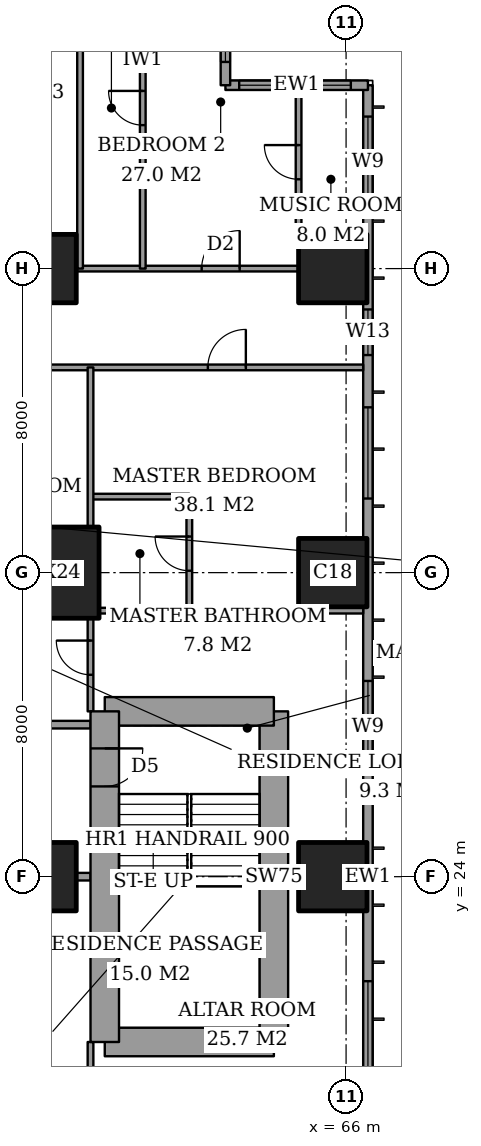
"""IFC4 building model, lengths in metres.
Left out: names, types, materials, properties, quantities, classifications, styles, units other than length and angle.
Written with IfcOpenShell. Run it as: python <this file> out.ifc"""

import sys

from ifc_helpers import new_model, si_unit, direction, frame, frame_2d, origin, origin_2d, place, context, subcontext, project, spatial, rectangle, extrude, element, fill, save


model = new_model("IFC4")
c1 = context("Model", 3, precision=1e-05, world=origin(), true_north=direction((0.0, 1.0)))
c2 = subcontext(c1, "Body", "Model", "MODEL_VIEW")
j1 = project(units=[si_unit("LENGTHUNIT", "METRE"), si_unit("PLANEANGLEUNIT", "RADIAN")], contexts=[c1])
p1 = place(None, origin())
s1 = spatial("IfcSite", under=j1, at=p1, CompositionType="ELEMENT")
p2 = place(p1, origin())
s2 = spatial("IfcBuilding", under=s1, at=p2, CompositionType="ELEMENT")
p3 = place(p2, frame((0.0, 0.0, 182.2)))
s3 = spatial("IfcBuildingStorey", under=s2, at=p3, CompositionType="ELEMENT", Elevation=182.2)
p4 = place(p3, frame((58.0, 24.0, 0.0), z_axis=(0.0, 0.0, 1.0), x_axis=(1.0, 0.0, 0.0)))
e1 = element("IfcColumn", 1, at=p4, inside=s3, PredefinedType="COLUMN", context=c2, shape_type="SweptSolid", body=[
    extrude(rectangle(XDim=1.8, YDim=1.8, at=origin_2d()), origin(), (0.0, 0.0, 1.0), 3.6),
])
p5 = place(p3, frame((58.0, 32.0, 0.0), z_axis=(0.0, 0.0, 1.0), x_axis=(1.0, 0.0, 0.0)))
e2 = element("IfcColumn", 2, at=p5, inside=s3, PredefinedType="COLUMN", context=c2, shape_type="SweptSolid", body=[
    extrude(rectangle(XDim=3.0, YDim=2.4, at=origin_2d()), origin(), (0.0, 0.0, 1.0), 3.6),
])
for number, where, z_axis, x_axis in (
    (3, (58.0, 40.0, 0.0), (0.0, 0.0, 1.0), (1.0, 0.0, 0.0)),
    (4, (65.65, 24.0, 0.0), (0.0, 0.0, 1.0), (1.0, 0.0, 0.0)),
    (5, (65.65, 32.0, 0.0), (0.0, 0.0, 1.0), (1.0, 0.0, 0.0)),
    (6, (65.65, 40.0, 0.0), (0.0, 0.0, 1.0), (1.0, 0.0, 0.0)),
):
    element("IfcColumn", number, at=place(p3, frame(where, z_axis=z_axis, x_axis=x_axis)), inside=s3, PredefinedType="COLUMN", context=c2, shape_type="SweptSolid", body=[
        extrude(rectangle(XDim=1.8, YDim=1.8, at=origin_2d()), origin(), (0.0, 0.0, 1.0), 3.6),
    ])
p6 = place(p3, frame((59.65, 19.65, 0.0), z_axis=(0.0, 0.0, 1.0), x_axis=(1.0, 0.0, 0.0)))
e7 = element("IfcWall", 7, at=p6, inside=s3, PredefinedType="SHEAR", context=c2, shape_type="SweptSolid", body=[
    extrude(rectangle(XDim=4.45, YDim=0.75, at=frame_2d((2.225, 0.0))), origin(), (0.0, 0.0, 1.0), 3.6),
])
p7 = place(p3, frame((64.1, 19.65, 0.0), z_axis=(0.0, 0.0, 1.0), x_axis=(0.0, 1.0, 0.0)))
e8 = element("IfcWall", 8, at=p7, inside=s3, PredefinedType="SHEAR", context=c2, shape_type="SweptSolid", body=[
    extrude(rectangle(XDim=8.7, YDim=0.75, at=frame_2d((4.35, 0.0))), origin(), (0.0, 0.0, 1.0), 3.6),
])
p8 = place(p3, frame((64.1, 28.35, 0.0), z_axis=(0.0, 0.0, 1.0), x_axis=(-1.0, 0.0, 0.0)))
e9 = element("IfcWall", 9, at=p8, inside=s3, PredefinedType="SHEAR", context=c2, shape_type="SweptSolid", body=[
    extrude(rectangle(XDim=4.45, YDim=0.75, at=frame_2d((2.225, 0.0))), origin(), (0.0, 0.0, 1.0), 3.6),
])
p9 = place(p3, frame((59.65, 28.35, 0.0), z_axis=(0.0, 0.0, 1.0), x_axis=(0.0, -1.0, 0.0)))
e10 = element("IfcWall", 10, at=p9, inside=s3, PredefinedType="SHEAR", context=c2, shape_type="SweptSolid", body=[
    extrude(rectangle(XDim=8.7, YDim=0.75, at=frame_2d((4.35, 0.0))), origin(), (0.0, 0.0, 1.0), 3.6),
])
p10 = place(p9, frame((0.975, 0.0, 0.0)))
e11 = element("IfcOpeningElement", 11, at=p10, cuts=e10, PredefinedType="OPENING", context=c2, shape_type="SweptSolid", body=[
    extrude(rectangle(XDim=1.0, YDim=2.1, at=frame_2d((0.5, 1.05))), frame((0.0, 0.385, 0.0), z_axis=(0.0, -1.0, 0.0), x_axis=(1.0, 0.0, 0.0)), (0.0, 0.0, 1.0), 0.77),
])
p11 = place(p3, frame((66.575, 3.175, 0.0), z_axis=(0.0, 0.0, 1.0), x_axis=(0.0, 1.0, 0.0)))
e12 = element("IfcWall", 12, at=p11, inside=s3, PredefinedType="SOLIDWALL", context=c2, shape_type="SweptSolid", body=[
    extrude(rectangle(XDim=41.65, YDim=0.25, at=frame_2d((20.825, 0.0))), origin(), (0.0, 0.0, 1.0), 3.6),
])
p12 = place(p11, frame((0.825, 0.0, 0.2)))
e13 = element("IfcOpeningElement", 13, at=p12, cuts=e12, PredefinedType="OPENING", context=c2, shape_type="SweptSolid", body=[
    extrude(rectangle(XDim=2.4, YDim=2.4, at=frame_2d((1.2, 1.2))), frame((0.0, 0.135, 0.0), z_axis=(0.0, -1.0, 0.0), x_axis=(1.0, 0.0, 0.0)), (0.0, 0.0, 1.0), 0.27),
])
p13 = place(p11, frame((6.6, 0.0, 0.2)))
e14 = element("IfcOpeningElement", 14, at=p13, cuts=e12, PredefinedType="OPENING", context=c2, shape_type="SweptSolid", body=[
    extrude(rectangle(XDim=1.2, YDim=2.4, at=frame_2d((0.6, 1.2))), frame((0.0, 0.135, 0.0), z_axis=(0.0, -1.0, 0.0), x_axis=(1.0, 0.0, 0.0)), (0.0, 0.0, 1.0), 0.27),
])
p14 = place(p11, frame((8.775, 0.0, 0.2)))
e15 = element("IfcOpeningElement", 15, at=p14, cuts=e12, PredefinedType="OPENING", context=c2, shape_type="SweptSolid", body=[
    extrude(rectangle(XDim=2.4, YDim=2.4, at=frame_2d((1.2, 1.2))), frame((0.0, 0.135, 0.0), z_axis=(0.0, -1.0, 0.0), x_axis=(1.0, 0.0, 0.0)), (0.0, 0.0, 1.0), 0.27),
])
p15 = place(p11, frame((15.675, 0.0, 0.2)))
e16 = element("IfcOpeningElement", 16, at=p15, cuts=e12, PredefinedType="OPENING", context=c2, shape_type="SweptSolid", body=[
    extrude(rectangle(XDim=2.4, YDim=2.4, at=frame_2d((1.2, 1.2))), frame((0.0, 0.135, 0.0), z_axis=(0.0, -1.0, 0.0), x_axis=(1.0, 0.0, 0.0)), (0.0, 0.0, 1.0), 0.27),
])
p16 = place(p11, frame((23.575, 0.0, 0.2)))
e17 = element("IfcOpeningElement", 17, at=p16, cuts=e12, PredefinedType="OPENING", context=c2, shape_type="SweptSolid", body=[
    extrude(rectangle(XDim=2.4, YDim=2.4, at=frame_2d((1.2, 1.2))), frame((0.0, 0.135, 0.0), z_axis=(0.0, -1.0, 0.0), x_axis=(1.0, 0.0, 0.0)), (0.0, 0.0, 1.0), 0.27),
])
p17 = place(p11, frame((30.775, 0.0, 0.2)))
e18 = element("IfcOpeningElement", 18, at=p17, cuts=e12, PredefinedType="OPENING", context=c2, shape_type="SweptSolid", body=[
    extrude(rectangle(XDim=2.4, YDim=2.4, at=frame_2d((1.2, 1.2))), frame((0.0, 0.135, 0.0), z_axis=(0.0, -1.0, 0.0), x_axis=(1.0, 0.0, 0.0)), (0.0, 0.0, 1.0), 0.27),
])
p18 = place(p11, frame((34.55, 0.0, 0.2)))
e19 = element("IfcOpeningElement", 19, at=p18, cuts=e12, PredefinedType="OPENING", context=c2, shape_type="SweptSolid", body=[
    extrude(rectangle(XDim=1.2, YDim=2.4, at=frame_2d((0.6, 1.2))), frame((0.0, 0.135, 0.0), z_axis=(0.0, -1.0, 0.0), x_axis=(1.0, 0.0, 0.0)), (0.0, 0.0, 1.0), 0.27),
])
p19 = place(p11, frame((38.425, 0.0, 0.2)))
e20 = element("IfcOpeningElement", 20, at=p19, cuts=e12, PredefinedType="OPENING", context=c2, shape_type="SweptSolid", body=[
    extrude(rectangle(XDim=2.4, YDim=2.4, at=frame_2d((1.2, 1.2))), frame((0.0, 0.135, 0.0), z_axis=(0.0, -1.0, 0.0), x_axis=(1.0, 0.0, 0.0)), (0.0, 0.0, 1.0), 0.27),
])
p20 = place(p3, frame((66.575, 44.825, 0.0), z_axis=(0.0, 0.0, 1.0), x_axis=(-1.0, 0.0, 0.0)))
e21 = element("IfcWall", 21, at=p20, inside=s3, PredefinedType="SOLIDWALL", context=c2, shape_type="SweptSolid", body=[
    extrude(rectangle(XDim=3.75, YDim=0.25, at=frame_2d((1.875, 0.0))), origin(), (0.0, 0.0, 1.0), 3.6),
])
p21 = place(p20, frame((0.45, 0.0, 0.2)))
e22 = element("IfcOpeningElement", 22, at=p21, cuts=e21, PredefinedType="OPENING", context=c2, shape_type="SweptSolid", body=[
    extrude(rectangle(XDim=1.2, YDim=2.4, at=frame_2d((0.6, 1.2))), frame((0.0, 0.135, 0.0), z_axis=(0.0, -1.0, 0.0), x_axis=(1.0, 0.0, 0.0)), (0.0, 0.0, 1.0), 0.27),
])
p22 = place(p20, frame((2.188, 0.0, 0.2)))
e23 = element("IfcOpeningElement", 23, at=p22, cuts=e21, PredefinedType="OPENING", context=c2, shape_type="SweptSolid", body=[
    extrude(rectangle(XDim=1.2, YDim=2.4, at=frame_2d((0.6, 1.2))), frame((0.0, 0.135, 0.0), z_axis=(0.0, -1.0, 0.0), x_axis=(1.0, 0.0, 0.0)), (0.0, 0.0, 1.0), 0.27),
])
p23 = place(p3, frame((62.825, 44.825, 0.0), z_axis=(0.0, 0.0, 1.0), x_axis=(0.0, 1.0, 0.0)))
e24 = element("IfcWall", 24, at=p23, inside=s3, PredefinedType="SOLIDWALL", context=c2, shape_type="SweptSolid", body=[
    extrude(rectangle(XDim=3.75, YDim=0.25, at=frame_2d((1.875, 0.0))), origin(), (0.0, 0.0, 1.0), 3.6),
])
p24 = place(p23, frame((0.613, 0.0, 0.2)))
e25 = element("IfcOpeningElement", 25, at=p24, cuts=e24, PredefinedType="OPENING", context=c2, shape_type="SweptSolid", body=[
    extrude(rectangle(XDim=2.4, YDim=2.4, at=frame_2d((1.2, 1.2))), frame((0.0, 0.135, 0.0), z_axis=(0.0, -1.0, 0.0), x_axis=(1.0, 0.0, 0.0)), (0.0, 0.0, 1.0), 0.27),
])
p25 = place(p3, frame((58.9, 24.0, 0.0), z_axis=(0.0, 0.0, 1.0), x_axis=(1.0, 0.0, 0.0)))
e26 = element("IfcWall", 26, at=p25, inside=s3, PredefinedType="PARTITIONING", context=c2, shape_type="SweptSolid", body=[
    extrude(rectangle(XDim=0.375, YDim=0.2, at=frame_2d((0.188, 0.0))), origin(), (0.0, 0.0, 1.0), 3.35),
])
p26 = place(p3, frame((42.0, 28.0, 0.0), z_axis=(0.0, 0.0, 1.0), x_axis=(1.0, 0.0, 0.0)))
e27 = element("IfcWall", 27, at=p26, inside=s3, PredefinedType="PARTITIONING", context=c2, shape_type="SweptSolid", body=[
    extrude(rectangle(XDim=17.275, YDim=0.2, at=frame_2d((8.637, 0.0))), origin(), (0.0, 0.0, 1.0), 3.35),
])
p27 = place(p26, frame((9.4, 0.0, 0.0)))
e28 = element("IfcOpeningElement", 28, at=p27, cuts=e27, PredefinedType="OPENING", context=c2, shape_type="SweptSolid", body=[
    extrude(rectangle(XDim=1.2, YDim=2.4, at=frame_2d((0.6, 1.2))), frame((0.0, 0.11, 0.0), z_axis=(0.0, -1.0, 0.0), x_axis=(1.0, 0.0, 0.0)), (0.0, 0.0, 1.0), 0.22),
])
p28 = place(p3, frame((59.5, 31.0, 0.0), z_axis=(0.0, 0.0, 1.0), x_axis=(1.0, 0.0, 0.0)))
e29 = element("IfcWall", 29, at=p28, inside=s3, PredefinedType="PARTITIONING", context=c2, shape_type="SweptSolid", body=[
    extrude(rectangle(XDim=6.95, YDim=0.15, at=frame_2d((3.475, 0.0))), origin(), (0.0, 0.0, 1.0), 3.35),
])
p29 = place(p3, frame((59.275, 34.0, 0.0), z_axis=(0.0, 0.0, 1.0), x_axis=(1.0, 0.0, 0.0)))
e30 = element("IfcWall", 30, at=p29, inside=s3, PredefinedType="PARTITIONING", context=c2, shape_type="SweptSolid", body=[
    extrude(rectangle(XDim=2.6, YDim=0.15, at=frame_2d((1.3, 0.0))), origin(), (0.0, 0.0, 1.0), 3.35),
])
p30 = place(p3, frame((41.439, 37.4, 0.0), z_axis=(0.0, 0.0, 1.0), x_axis=(1.0, 0.0, 0.0)))
e31 = element("IfcWall", 31, at=p30, inside=s3, PredefinedType="PARTITIONING", context=c2, shape_type="SweptSolid", body=[
    extrude(rectangle(XDim=25.011, YDim=0.15, at=frame_2d((12.505, 0.0))), origin(), (0.0, 0.0, 1.0), 3.35),
])
p31 = place(p30, frame((10.761, 0.0, 0.0)))
e32 = element("IfcOpeningElement", 32, at=p31, cuts=e31, PredefinedType="OPENING", context=c2, shape_type="SweptSolid", body=[
    extrude(rectangle(XDim=1.0, YDim=2.1, at=frame_2d((0.5, 1.05))), frame((0.0, 0.085, 0.0), z_axis=(0.0, -1.0, 0.0), x_axis=(1.0, 0.0, 0.0)), (0.0, 0.0, 1.0), 0.17),
])
p32 = place(p30, frame((20.924, 0.0, 0.0)))
e33 = element("IfcOpeningElement", 33, at=p32, cuts=e31, PredefinedType="OPENING", context=c2, shape_type="SweptSolid", body=[
    extrude(rectangle(XDim=1.0, YDim=2.1, at=frame_2d((0.5, 1.05))), frame((0.0, 0.085, 0.0), z_axis=(0.0, -1.0, 0.0), x_axis=(1.0, 0.0, 0.0)), (0.0, 0.0, 1.0), 0.17),
])
p33 = place(p30, frame((15.749, 0.0, 0.0)))
e34 = element("IfcOpeningElement", 34, at=p33, cuts=e31, PredefinedType="OPENING", context=c2, shape_type="SweptSolid", body=[
    extrude(rectangle(XDim=0.9, YDim=2.1, at=frame_2d((0.45, 1.05))), frame((0.0, 0.085, 0.0), z_axis=(0.0, -1.0, 0.0), x_axis=(1.0, 0.0, 0.0)), (0.0, 0.0, 1.0), 0.17),
])
p34 = place(p30, frame((12.961, 0.0, 0.0)))
e35 = element("IfcOpeningElement", 35, at=p34, cuts=e31, PredefinedType="OPENING", context=c2, shape_type="SweptSolid", body=[
    extrude(rectangle(XDim=1.0, YDim=2.1, at=frame_2d((0.5, 1.05))), frame((0.0, 0.085, 0.0), z_axis=(0.0, -1.0, 0.0), x_axis=(1.0, 0.0, 0.0)), (0.0, 0.0, 1.0), 0.17),
])
p35 = place(p30, frame((7.911, 0.0, 0.0)))
e36 = element("IfcOpeningElement", 36, at=p35, cuts=e31, PredefinedType="OPENING", context=c2, shape_type="SweptSolid", body=[
    extrude(rectangle(XDim=0.9, YDim=2.1, at=frame_2d((0.45, 1.05))), frame((0.0, 0.085, 0.0), z_axis=(0.0, -1.0, 0.0), x_axis=(1.0, 0.0, 0.0)), (0.0, 0.0, 1.0), 0.17),
])
p36 = place(p30, frame((2.836, 0.0, 0.0)))
e37 = element("IfcOpeningElement", 37, at=p36, cuts=e31, PredefinedType="OPENING", context=c2, shape_type="SweptSolid", body=[
    extrude(rectangle(XDim=1.0, YDim=2.1, at=frame_2d((0.5, 1.05))), frame((0.0, 0.085, 0.0), z_axis=(0.0, -1.0, 0.0), x_axis=(1.0, 0.0, 0.0)), (0.0, 0.0, 1.0), 0.17),
])
p37 = place(p3, frame((58.9, 40.0, 0.0), z_axis=(0.0, 0.0, 1.0), x_axis=(1.0, 0.0, 0.0)))
e38 = element("IfcWall", 38, at=p37, inside=s3, PredefinedType="PARTITIONING", context=c2, shape_type="SweptSolid", body=[
    extrude(rectangle(XDim=5.85, YDim=0.15, at=frame_2d((2.925, 0.0))), origin(), (0.0, 0.0, 1.0), 3.35),
])
p38 = place(p37, frame((3.3, 0.0, 0.0)))
e39 = element("IfcOpeningElement", 39, at=p38, cuts=e38, PredefinedType="OPENING", context=c2, shape_type="SweptSolid", body=[
    extrude(rectangle(XDim=1.0, YDim=2.1, at=frame_2d((0.5, 1.05))), frame((0.0, 0.085, 0.0), z_axis=(0.0, -1.0, 0.0), x_axis=(1.0, 0.0, 0.0)), (0.0, 0.0, 1.0), 0.17),
])
p39 = place(p3, frame((59.0, 40.0, 0.0), z_axis=(0.0, 0.0, 1.0), x_axis=(0.0, 1.0, 0.0)))
e40 = element("IfcWall", 40, at=p39, inside=s3, PredefinedType="PARTITIONING", context=c2, shape_type="SweptSolid", body=[
    extrude(rectangle(XDim=8.45, YDim=0.15, at=frame_2d((4.225, 0.0))), origin(), (0.0, 0.0, 1.0), 3.35),
])
p40 = place(p3, frame((59.275, 17.2, 0.0), z_axis=(0.0, 0.0, 1.0), x_axis=(0.0, 1.0, 0.0)))
e41 = element("IfcWall", 41, at=p40, inside=s3, PredefinedType="PARTITIONING", context=c2, shape_type="SweptSolid", body=[
    extrude(rectangle(XDim=2.45, YDim=0.15, at=frame_2d((1.225, 0.0))), origin(), (0.0, 0.0, 1.0), 3.35),
])
p41 = place(p40, frame((0.538, 0.0, 0.0)))
e42 = element("IfcOpeningElement", 42, at=p41, cuts=e41, PredefinedType="OPENING", context=c2, shape_type="SweptSolid", body=[
    extrude(rectangle(XDim=1.0, YDim=2.1, at=frame_2d((0.5, 1.05))), frame((0.0, 0.085, 0.0), z_axis=(0.0, -1.0, 0.0), x_axis=(1.0, 0.0, 0.0)), (0.0, 0.0, 1.0), 0.17),
])
p42 = place(p3, frame((59.275, 28.35, 0.0), z_axis=(0.0, 0.0, 1.0), x_axis=(0.0, 1.0, 0.0)))
e43 = element("IfcWall", 43, at=p42, inside=s3, PredefinedType="PARTITIONING", context=c2, shape_type="SweptSolid", body=[
    extrude(rectangle(XDim=2.45, YDim=0.15, at=frame_2d((1.225, 0.0))), origin(), (0.0, 0.0, 1.0), 3.35),
])
p43 = place(p42, frame((0.962, 0.0, 0.0)))
e44 = element("IfcOpeningElement", 44, at=p43, cuts=e43, PredefinedType="OPENING", context=c2, shape_type="SweptSolid", body=[
    extrude(rectangle(XDim=0.9, YDim=2.1, at=frame_2d((0.45, 1.05))), frame((0.0, 0.085, 0.0), z_axis=(0.0, -1.0, 0.0), x_axis=(1.0, 0.0, 0.0)), (0.0, 0.0, 1.0), 0.17),
])
p44 = place(p3, frame((59.275, 33.2, 0.0), z_axis=(0.0, 0.0, 1.0), x_axis=(0.0, 1.0, 0.0)))
e45 = element("IfcWall", 45, at=p44, inside=s3, PredefinedType="PARTITIONING", context=c2, shape_type="SweptSolid", body=[
    extrude(rectangle(XDim=4.2, YDim=0.15, at=frame_2d((2.1, 0.0))), origin(), (0.0, 0.0, 1.0), 3.35),
])
p45 = place(p3, frame((60.65, 40.0, 0.0), z_axis=(0.0, 0.0, 1.0), x_axis=(0.0, 1.0, 0.0)))
e46 = element("IfcWall", 46, at=p45, inside=s3, PredefinedType="PARTITIONING", context=c2, shape_type="SweptSolid", body=[
    extrude(rectangle(XDim=8.45, YDim=0.15, at=frame_2d((4.225, 0.0))), origin(), (0.0, 0.0, 1.0), 3.35),
])
p46 = place(p45, frame((3.775, 0.0, 0.0)))
e47 = element("IfcOpeningElement", 47, at=p46, cuts=e46, PredefinedType="OPENING", context=c2, shape_type="SweptSolid", body=[
    extrude(rectangle(XDim=0.9, YDim=2.1, at=frame_2d((0.45, 1.05))), frame((0.0, 0.085, 0.0), z_axis=(0.0, -1.0, 0.0), x_axis=(1.0, 0.0, 0.0)), (0.0, 0.0, 1.0), 0.17),
])
p47 = place(p3, frame((61.875, 31.0, 0.0), z_axis=(0.0, 0.0, 1.0), x_axis=(0.0, 1.0, 0.0)))
e48 = element("IfcWall", 48, at=p47, inside=s3, PredefinedType="PARTITIONING", context=c2, shape_type="SweptSolid", body=[
    extrude(rectangle(XDim=3.0, YDim=0.15, at=frame_2d((1.5, 0.0))), origin(), (0.0, 0.0, 1.0), 3.35),
])
p48 = place(p47, frame((1.05, 0.0, 0.0)))
e49 = element("IfcOpeningElement", 49, at=p48, cuts=e48, PredefinedType="OPENING", context=c2, shape_type="SweptSolid", body=[
    extrude(rectangle(XDim=0.9, YDim=2.1, at=frame_2d((0.45, 1.05))), frame((0.0, 0.085, 0.0), z_axis=(0.0, -1.0, 0.0), x_axis=(1.0, 0.0, 0.0)), (0.0, 0.0, 1.0), 0.17),
])
p49 = place(p3, frame((64.75, 40.9, 0.0), z_axis=(0.0, 0.0, 1.0), x_axis=(0.0, 1.0, 0.0)))
e50 = element("IfcWall", 50, at=p49, inside=s3, PredefinedType="PARTITIONING", context=c2, shape_type="SweptSolid", body=[
    extrude(rectangle(XDim=3.8, YDim=0.15, at=frame_2d((1.9, 0.0))), origin(), (0.0, 0.0, 1.0), 3.35),
])
p50 = place(p49, frame((1.45, 0.0, 0.0)))
e51 = element("IfcOpeningElement", 51, at=p50, cuts=e50, PredefinedType="OPENING", context=c2, shape_type="SweptSolid", body=[
    extrude(rectangle(XDim=0.9, YDim=2.1, at=frame_2d((0.45, 1.05))), frame((0.0, 0.085, 0.0), z_axis=(0.0, -1.0, 0.0), x_axis=(1.0, 0.0, 0.0)), (0.0, 0.0, 1.0), 0.17),
])
p51 = place(p15, origin())
e52 = element("IfcWindow", 52, at=p51, inside=s3, PartitioningType="SINGLE_PANEL", PredefinedType="WINDOW", context=c2, shape_type="SweptSolid", body=[
    extrude(rectangle(XDim=2.4, YDim=2.4, at=frame_2d((1.2, 1.2))), frame((0.0, 0.03, 0.0), z_axis=(0.0, -1.0, 0.0), x_axis=(1.0, 0.0, 0.0)), (0.0, 0.0, 1.0), 0.06),
])
fill(e16, e52)
p52 = place(p16, origin())
e53 = element("IfcWindow", 53, at=p52, inside=s3, PartitioningType="SINGLE_PANEL", PredefinedType="WINDOW", context=c2, shape_type="SweptSolid", body=[
    extrude(rectangle(XDim=2.4, YDim=2.4, at=frame_2d((1.2, 1.2))), frame((0.0, 0.03, 0.0), z_axis=(0.0, -1.0, 0.0), x_axis=(1.0, 0.0, 0.0)), (0.0, 0.0, 1.0), 0.06),
])
fill(e17, e53)
p53 = place(p17, origin())
e54 = element("IfcWindow", 54, at=p53, inside=s3, PartitioningType="SINGLE_PANEL", PredefinedType="WINDOW", context=c2, shape_type="SweptSolid", body=[
    extrude(rectangle(XDim=2.4, YDim=2.4, at=frame_2d((1.2, 1.2))), frame((0.0, 0.03, 0.0), z_axis=(0.0, -1.0, 0.0), x_axis=(1.0, 0.0, 0.0)), (0.0, 0.0, 1.0), 0.06),
])
fill(e18, e54)
p54 = place(p18, origin())
e55 = element("IfcWindow", 55, at=p54, inside=s3, PartitioningType="SINGLE_PANEL", PredefinedType="WINDOW", context=c2, shape_type="SweptSolid", body=[
    extrude(rectangle(XDim=1.2, YDim=2.4, at=frame_2d((0.6, 1.2))), frame((0.0, 0.03, 0.0), z_axis=(0.0, -1.0, 0.0), x_axis=(1.0, 0.0, 0.0)), (0.0, 0.0, 1.0), 0.06),
])
fill(e19, e55)
p55 = place(p19, origin())
e56 = element("IfcWindow", 56, at=p55, inside=s3, PartitioningType="SINGLE_PANEL", PredefinedType="WINDOW", context=c2, shape_type="SweptSolid", body=[
    extrude(rectangle(XDim=2.4, YDim=2.4, at=frame_2d((1.2, 1.2))), frame((0.0, 0.03, 0.0), z_axis=(0.0, -1.0, 0.0), x_axis=(1.0, 0.0, 0.0)), (0.0, 0.0, 1.0), 0.06),
])
fill(e20, e56)
p56 = place(p21, origin())
e57 = element("IfcWindow", 57, at=p56, inside=s3, PartitioningType="SINGLE_PANEL", PredefinedType="WINDOW", context=c2, shape_type="SweptSolid", body=[
    extrude(rectangle(XDim=1.2, YDim=2.4, at=frame_2d((0.6, 1.2))), frame((0.0, 0.03, 0.0), z_axis=(0.0, -1.0, 0.0), x_axis=(1.0, 0.0, 0.0)), (0.0, 0.0, 1.0), 0.06),
])
fill(e22, e57)
p57 = place(p22, origin())
e58 = element("IfcWindow", 58, at=p57, inside=s3, PartitioningType="SINGLE_PANEL", PredefinedType="WINDOW", context=c2, shape_type="SweptSolid", body=[
    extrude(rectangle(XDim=1.2, YDim=2.4, at=frame_2d((0.6, 1.2))), frame((0.0, 0.03, 0.0), z_axis=(0.0, -1.0, 0.0), x_axis=(1.0, 0.0, 0.0)), (0.0, 0.0, 1.0), 0.06),
])
fill(e23, e58)
p58 = place(p24, origin())
e59 = element("IfcWindow", 59, at=p58, inside=s3, PartitioningType="SINGLE_PANEL", PredefinedType="WINDOW", context=c2, shape_type="SweptSolid", body=[
    extrude(rectangle(XDim=2.4, YDim=2.4, at=frame_2d((1.2, 1.2))), frame((0.0, 0.03, 0.0), z_axis=(0.0, -1.0, 0.0), x_axis=(1.0, 0.0, 0.0)), (0.0, 0.0, 1.0), 0.06),
])
fill(e25, e59)
p59 = place(p50, origin())
e60 = element("IfcDoor", 60, at=p59, inside=s3, OperationType="SINGLE_SWING_LEFT", PredefinedType="DOOR", context=c2, shape_type="SweptSolid", body=[
    extrude(rectangle(XDim=0.9, YDim=2.1, at=frame_2d((0.45, 1.05))), frame((0.0, 0.025, 0.0), z_axis=(0.0, -1.0, 0.0), x_axis=(1.0, 0.0, 0.0)), (0.0, 0.0, 1.0), 0.05),
])
fill(e51, e60)
p60 = place(p38, origin())
e61 = element("IfcDoor", 61, at=p60, inside=s3, OperationType="SINGLE_SWING_LEFT", PredefinedType="DOOR", context=c2, shape_type="SweptSolid", body=[
    extrude(rectangle(XDim=1.0, YDim=2.1, at=frame_2d((0.5, 1.05))), frame((0.0, 0.025, 0.0), z_axis=(0.0, -1.0, 0.0), x_axis=(1.0, 0.0, 0.0)), (0.0, 0.0, 1.0), 0.05),
])
fill(e39, e61)
p61 = place(p46, origin())
e62 = element("IfcDoor", 62, at=p61, inside=s3, OperationType="SINGLE_SWING_LEFT", PredefinedType="DOOR", context=c2, shape_type="SweptSolid", body=[
    extrude(rectangle(XDim=0.9, YDim=2.1, at=frame_2d((0.45, 1.05))), frame((0.0, 0.025, 0.0), z_axis=(0.0, -1.0, 0.0), x_axis=(1.0, 0.0, 0.0)), (0.0, 0.0, 1.0), 0.05),
])
fill(e47, e62)
p62 = place(p48, origin())
e63 = element("IfcDoor", 63, at=p62, inside=s3, OperationType="SINGLE_SWING_LEFT", PredefinedType="DOOR", context=c2, shape_type="SweptSolid", body=[
    extrude(rectangle(XDim=0.9, YDim=2.1, at=frame_2d((0.45, 1.05))), frame((0.0, 0.025, 0.0), z_axis=(0.0, -1.0, 0.0), x_axis=(1.0, 0.0, 0.0)), (0.0, 0.0, 1.0), 0.05),
])
fill(e49, e63)
p63 = place(p32, origin())
e64 = element("IfcDoor", 64, at=p63, inside=s3, OperationType="SINGLE_SWING_LEFT", PredefinedType="DOOR", context=c2, shape_type="SweptSolid", body=[
    extrude(rectangle(XDim=1.0, YDim=2.1, at=frame_2d((0.5, 1.05))), frame((0.0, 0.025, 0.0), z_axis=(0.0, -1.0, 0.0), x_axis=(1.0, 0.0, 0.0)), (0.0, 0.0, 1.0), 0.05),
])
fill(e33, e64)
p64 = place(p43, origin())
e65 = element("IfcDoor", 65, at=p64, inside=s3, OperationType="SINGLE_SWING_LEFT", PredefinedType="DOOR", context=c2, shape_type="SweptSolid", body=[
    extrude(rectangle(XDim=0.9, YDim=2.1, at=frame_2d((0.45, 1.05))), frame((0.0, 0.025, 0.0), z_axis=(0.0, -1.0, 0.0), x_axis=(1.0, 0.0, 0.0)), (0.0, 0.0, 1.0), 0.05),
])
fill(e44, e65)
p65 = place(p10, origin())
e66 = element("IfcDoor", 66, at=p65, inside=s3, OperationType="SINGLE_SWING_RIGHT", PredefinedType="DOOR", context=c2, shape_type="SweptSolid", body=[
    extrude(rectangle(XDim=1.0, YDim=2.1, at=frame_2d((0.5, 1.05))), frame((0.0, 0.025, 0.0), z_axis=(0.0, -1.0, 0.0), x_axis=(1.0, 0.0, 0.0)), (0.0, 0.0, 1.0), 0.05),
])
fill(e11, e66)
save(model, sys.argv[1])
